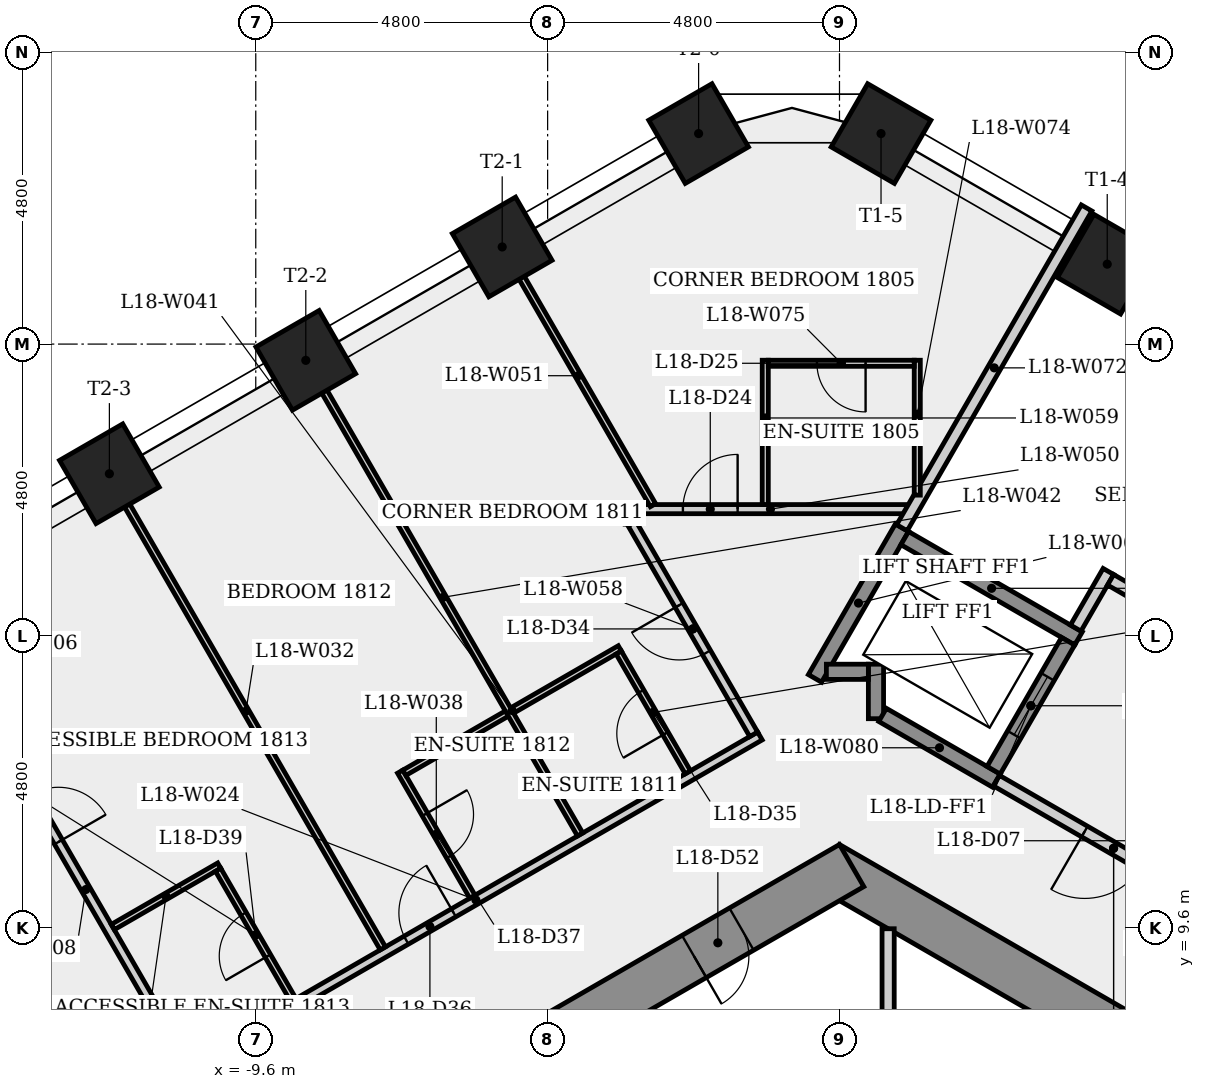
"""IFC4 building model, lengths in metres.
Left out: names, types, materials, properties, quantities, classifications, styles, units other than length and angle.
Written with IfcOpenShell. Run it as: python <this file> out.ifc"""

import sys

from ifc_helpers import new_model, si_unit, direction, frame, frame_2d, origin, origin_2d, place, context, subcontext, project, spatial, rectangle, extrude, element, fill, save


model = new_model("IFC4")
c1 = context("Model", 3, precision=1e-05, world=origin(), true_north=direction((0.0, 1.0)))
c2 = subcontext(c1, "Body", "Model", "MODEL_VIEW")
j1 = project(units=[si_unit("LENGTHUNIT", "METRE"), si_unit("PLANEANGLEUNIT", "RADIAN")], contexts=[c1])
p1 = place(None, origin())
s1 = spatial("IfcSite", under=j1, at=p1, CompositionType="ELEMENT")
p2 = place(p1, origin())
s2 = spatial("IfcBuilding", under=s1, at=p2, CompositionType="ELEMENT")
p3 = place(p2, frame((0.0, 0.0, 70.3)))
s3 = spatial("IfcBuildingStorey", under=s2, at=p3, CompositionType="ELEMENT", Elevation=70.3)
p4 = place(p3, frame((9.3, 5.138, 0.0), z_axis=(0.0, 0.0, 1.0), x_axis=(-0.866023993627, 0.500002442456, 0.0)))
e1 = element("IfcWall", 1, at=p4, inside=s3, PredefinedType="SHEAR", context=c2, shape_type="SweptSolid", body=[
    extrude(rectangle(XDim=10.97, YDim=0.8, at=frame_2d((5.485, 0.0))), origin(), (0.0, 0.0, 1.0), 4.0),
])
p5 = place(p4, frame((2.962, 0.0, 0.0)))
e2 = element("IfcOpeningElement", 2, at=p5, cuts=e1, PredefinedType="OPENING", context=c2, shape_type="SweptSolid", body=[
    extrude(rectangle(XDim=0.9, YDim=2.1, at=frame_2d((0.45, 1.05))), frame((0.0, 0.41, 0.0), z_axis=(0.0, -1.0, 0.0), x_axis=(1.0, 0.0, 0.0)), (0.0, 0.0, 1.0), 0.82),
])
p6 = place(p3, frame((0.2, 10.623, 0.0), z_axis=(0.0, 0.0, 1.0), x_axis=(-0.866023993627, -0.500002442456, 0.0)))
e3 = element("IfcWall", 3, at=p6, inside=s3, PredefinedType="SHEAR", context=c2, shape_type="SweptSolid", body=[
    extrude(rectangle(XDim=10.97, YDim=0.8, at=frame_2d((5.485, 0.0))), origin(), (0.0, 0.0, 1.0), 4.0),
])
p7 = place(p6, frame((9.325, 0.0, 0.0)))
e4 = element("IfcOpeningElement", 4, at=p7, cuts=e3, PredefinedType="OPENING", context=c2, shape_type="SweptSolid", body=[
    extrude(rectangle(XDim=0.9, YDim=2.1, at=frame_2d((0.45, 1.05))), frame((0.0, 0.41, 0.0), z_axis=(0.0, -1.0, 0.0), x_axis=(1.0, 0.0, 0.0)), (0.0, 0.0, 1.0), 0.82),
])
p8 = place(p6, frame((2.091, 0.0, 0.0)))
e5 = element("IfcOpeningElement", 5, at=p8, cuts=e3, PredefinedType="OPENING", context=c2, shape_type="SweptSolid", body=[
    extrude(rectangle(XDim=0.9, YDim=2.1, at=frame_2d((0.45, 1.05))), frame((0.0, 0.41, 0.0), z_axis=(0.0, -1.0, 0.0), x_axis=(1.0, 0.0, 0.0)), (0.0, 0.0, 1.0), 0.82),
])
for number, where, z_axis, x_axis in (
    (6, (4.403, 20.514, 0.0), (0.0, 0.0, 1.0), (0.5, 0.866, 0.0)),
    (7, (0.683, 22.662, 0.0), (0.0, 0.0, 1.0), (0.5, 0.866, 0.0)),
    (8, (-2.317, 22.662, 0.0), (0.0, 0.0, 1.0), (-0.5, 0.866, 0.0)),
    (9, (-5.547, 20.797, 0.0), (0.0, 0.0, 1.0), (-0.5, 0.866, 0.0)),
    (10, (-8.777, 18.932, 0.0), (0.0, 0.0, 1.0), (-0.5, 0.866, 0.0)),
    (11, (-12.007, 17.068, 0.0), (0.0, 0.0, 1.0), (-0.5, 0.866, 0.0)),
):
    element("IfcColumn", number, at=place(p3, frame(where, z_axis=z_axis, x_axis=x_axis)), inside=s3, PredefinedType="COLUMN", context=c2, shape_type="SweptSolid", body=[
        extrude(rectangle(XDim=1.2, YDim=1.2, at=origin_2d()), origin(), (0.0, 0.0, 1.0), 4.0),
    ])
p9 = place(p3, frame((-14.11, 13.2, 0.0), z_axis=(0.0, 0.0, 1.0), x_axis=(0.500007857356, -0.866020867291, 0.0)))
e12 = element("IfcWall", 12, at=p9, inside=s3, PredefinedType="PARTITIONING", context=c2, shape_type="SweptSolid", body=[
    extrude(rectangle(XDim=6.862, YDim=0.15, at=frame_2d((3.431, 0.0))), origin(), (0.0, 0.0, 1.0), 3.6),
])
p10 = place(p9, frame((1.628, 0.0, 0.0)))
e13 = element("IfcOpeningElement", 13, at=p10, cuts=e12, PredefinedType="OPENING", context=c2, shape_type="SweptSolid", body=[
    extrude(rectangle(XDim=0.9, YDim=2.1, at=frame_2d((0.45, 1.05))), frame((0.0, 0.085, 0.0), z_axis=(0.0, -1.0, 0.0), x_axis=(1.0, 0.0, 0.0)), (0.0, 0.0, 1.0), 0.17),
])
p11 = place(p3, frame((-10.651, 7.361, 0.0), z_axis=(0.0, 0.0, 1.0), x_axis=(0.866029938532, 0.499992145504, 0.0)))
e14 = element("IfcWall", 14, at=p11, inside=s3, PredefinedType="PARTITIONING", context=c2, shape_type="SweptSolid", body=[
    extrude(rectangle(XDim=10.788, YDim=0.15, at=frame_2d((5.394, 0.0))), origin(), (0.0, 0.0, 1.0), 3.6),
])
p12 = place(p11, frame((4.071, 0.0, 0.0)))
e15 = element("IfcOpeningElement", 15, at=p12, cuts=e14, PredefinedType="OPENING", context=c2, shape_type="SweptSolid", body=[
    extrude(rectangle(XDim=0.9, YDim=2.1, at=frame_2d((0.45, 1.05))), frame((0.0, 0.085, 0.0), z_axis=(0.0, -1.0, 0.0), x_axis=(1.0, 0.0, 0.0)), (0.0, 0.0, 1.0), 0.17),
])
p13 = place(p3, frame((-10.201, 10.623, 0.0), z_axis=(0.0, 0.0, 1.0), x_axis=(-0.866026663364, -0.499997818338, 0.0)))
e16 = element("IfcWall", 16, at=p13, inside=s3, PredefinedType="PARTITIONING", context=c2, shape_type="SweptSolid", body=[
    extrude(rectangle(XDim=2.021, YDim=0.1, at=frame_2d((1.01, 0.0))), origin(), (0.0, 0.0, 1.0), 3.6),
])
p14 = place(p3, frame((-8.982, 8.411, 0.0), z_axis=(0.0, 0.0, 1.0), x_axis=(-0.4999899861, 0.866031185235, 0.0)))
e17 = element("IfcWall", 17, at=p14, inside=s3, PredefinedType="PARTITIONING", context=c2, shape_type="SweptSolid", body=[
    extrude(rectangle(XDim=2.475, YDim=0.1, at=frame_2d((1.238, 0.0))), origin(), (0.0, 0.0, 1.0), 3.6),
])
p15 = place(p14, frame((0.837, 0.0, 0.0)))
e18 = element("IfcOpeningElement", 18, at=p15, cuts=e17, PredefinedType="OPENING", context=c2, shape_type="SweptSolid", body=[
    extrude(rectangle(XDim=0.8, YDim=2.1, at=frame_2d((0.4, 1.05))), frame((0.0, 0.06, 0.0), z_axis=(0.0, -1.0, 0.0), x_axis=(1.0, 0.0, 0.0)), (0.0, 0.0, 1.0), 0.12),
])
p16 = place(p3, frame((-7.51, 9.261, 0.0), z_axis=(0.0, 0.0, 1.0), x_axis=(-0.500009404554, 0.866019973994, 0.0)))
e19 = element("IfcWall", 19, at=p16, inside=s3, PredefinedType="PARTITIONING", context=c2, shape_type="SweptSolid", body=[
    extrude(rectangle(XDim=9.01, YDim=0.1, at=frame_2d((4.505, 0.0))), origin(), (0.0, 0.0, 1.0), 3.6),
])
p17 = place(p3, frame((-7.225, 12.168, 0.0), z_axis=(0.0, 0.0, 1.0), x_axis=(0.500030943131, -0.866007538022, 0.0)))
e20 = element("IfcWall", 20, at=p17, inside=s3, PredefinedType="PARTITIONING", context=c2, shape_type="SweptSolid", body=[
    extrude(rectangle(XDim=2.375, YDim=0.1, at=frame_2d((1.188, 0.0))), origin(), (0.0, 0.0, 1.0), 3.6),
])
p18 = place(p17, frame((0.812, 0.0, 0.0)))
e21 = element("IfcOpeningElement", 21, at=p18, cuts=e20, PredefinedType="OPENING", context=c2, shape_type="SweptSolid", body=[
    extrude(rectangle(XDim=0.8, YDim=2.1, at=frame_2d((0.4, 1.05))), frame((0.0, 0.06, 0.0), z_axis=(0.0, -1.0, 0.0), x_axis=(1.0, 0.0, 0.0)), (0.0, 0.0, 1.0), 0.12),
])
p19 = place(p3, frame((-7.156, 12.149, 0.0), z_axis=(0.0, 0.0, 1.0), x_axis=(0.866005746929, 0.500034045127, 0.0)))
e22 = element("IfcWall", 22, at=p19, inside=s3, PredefinedType="PARTITIONING", context=c2, shape_type="SweptSolid", body=[
    extrude(rectangle(XDim=4.092, YDim=0.1, at=frame_2d((2.046, 0.0))), origin(), (0.0, 0.0, 1.0), 3.6),
])
p20 = place(p3, frame((-8.77, 18.937, 0.0), z_axis=(0.0, 0.0, 1.0), x_axis=(0.499997670926, -0.866026748472, 0.0)))
e23 = element("IfcWall", 23, at=p20, inside=s3, PredefinedType="PARTITIONING", context=c2, shape_type="SweptSolid", body=[
    extrude(rectangle(XDim=9.01, YDim=0.1, at=frame_2d((4.505, 0.0))), origin(), (0.0, 0.0, 1.0), 3.6),
])
p21 = place(p3, frame((-3.45, 16.239, 0.0), z_axis=(0.0, 0.0, 1.0), x_axis=(0.0, 1.0, 0.0)))
e24 = element("IfcWall", 24, at=p21, inside=s3, PredefinedType="PARTITIONING", context=c2, shape_type="SweptSolid", body=[
    extrude(rectangle(XDim=0.322, YDim=0.15, at=frame_2d((0.161, 0.0))), origin(), (0.0, 0.0, 1.0), 3.6),
])
p22 = place(p3, frame((-3.375, 16.485, 0.0), z_axis=(0.0, 0.0, 1.0), x_axis=(1.0, 0.0, 0.0)))
e25 = element("IfcWall", 25, at=p22, inside=s3, PredefinedType="PARTITIONING", context=c2, shape_type="SweptSolid", body=[
    extrude(rectangle(XDim=4.479, YDim=0.15, at=frame_2d((2.24, 0.0))), origin(), (0.0, 0.0, 1.0), 3.6),
])
p23 = place(p22, frame((0.8, 0.0, 0.0)))
e26 = element("IfcOpeningElement", 26, at=p23, cuts=e25, PredefinedType="OPENING", context=c2, shape_type="SweptSolid", body=[
    extrude(rectangle(XDim=0.9, YDim=2.1, at=frame_2d((0.45, 1.05))), frame((0.0, 0.085, 0.0), z_axis=(0.0, -1.0, 0.0), x_axis=(1.0, 0.0, 0.0)), (0.0, 0.0, 1.0), 0.17),
])
p24 = place(p3, frame((-3.067, 16.55, 0.0), z_axis=(0.0, 0.0, 1.0), x_axis=(-0.499983141994, 0.86603513654, 0.0)))
e27 = element("IfcWall", 27, at=p24, inside=s3, PredefinedType="PARTITIONING", context=c2, shape_type="SweptSolid", body=[
    extrude(rectangle(XDim=4.918, YDim=0.1, at=frame_2d((2.459, 0.0))), origin(), (0.0, 0.0, 1.0), 3.6),
])
p25 = place(p3, frame((-2.494, 12.157, 0.0), z_axis=(0.0, 0.0, 1.0), x_axis=(-0.499982560684, 0.866035472144, 0.0)))
e28 = element("IfcWall", 28, at=p25, inside=s3, PredefinedType="PARTITIONING", context=c2, shape_type="SweptSolid", body=[
    extrude(rectangle(XDim=2.275, YDim=0.1, at=frame_2d((1.137, 0.0))), origin(), (0.0, 0.0, 1.0), 3.6),
])
p26 = place(p25, frame((0.738, 0.0, 0.0)))
e29 = element("IfcOpeningElement", 29, at=p26, cuts=e28, PredefinedType="OPENING", context=c2, shape_type="SweptSolid", body=[
    extrude(rectangle(XDim=0.8, YDim=2.1, at=frame_2d((0.4, 1.05))), frame((0.0, 0.06, 0.0), z_axis=(0.0, -1.0, 0.0), x_axis=(1.0, 0.0, 0.0)), (0.0, 0.0, 1.0), 0.12),
])
p27 = place(p3, frame((-1.411, 12.782, 0.0), z_axis=(0.0, 0.0, 1.0), x_axis=(-0.500055051143, 0.865993617659, 0.0)))
e30 = element("IfcWall", 30, at=p27, inside=s3, PredefinedType="PARTITIONING", context=c2, shape_type="SweptSolid", body=[
    extrude(rectangle(XDim=4.003, YDim=0.15, at=frame_2d((2.001, 0.0))), origin(), (0.0, 0.0, 1.0), 3.6),
])
p28 = place(p27, frame((1.552, 0.0, 0.0)))
e31 = element("IfcOpeningElement", 31, at=p28, cuts=e30, PredefinedType="OPENING", context=c2, shape_type="SweptSolid", body=[
    extrude(rectangle(XDim=0.9, YDim=2.1, at=frame_2d((0.45, 1.05))), frame((0.0, 0.085, 0.0), z_axis=(0.0, -1.0, 0.0), x_axis=(1.0, 0.0, 0.0)), (0.0, 0.0, 1.0), 0.17),
])
p29 = place(p3, frame((-1.221, 18.934, 0.0), z_axis=(0.0, 0.0, 1.0), x_axis=(0.0, -1.0, 0.0)))
e32 = element("IfcWall", 32, at=p29, inside=s3, PredefinedType="PARTITIONING", context=c2, shape_type="SweptSolid", body=[
    extrude(rectangle(XDim=2.374, YDim=0.1, at=frame_2d((1.187, 0.0))), origin(), (0.0, 0.0, 1.0), 3.6),
])
p30 = place(p3, frame((-0.403, 13.702, 0.0), z_axis=(0.0, 0.0, 1.0), x_axis=(0.499976111731, 0.866039195244, 0.0)))
e33 = element("IfcWall", 33, at=p30, inside=s3, PredefinedType="SHEAR", context=c2, shape_type="SweptSolid", body=[
    extrude(rectangle(XDim=2.861, YDim=0.25, at=frame_2d((1.43, 0.0))), origin(), (0.0, 0.0, 1.0), 3.6),
])
p31 = place(p3, frame((0.6, 13.039, 0.0), z_axis=(0.0, 0.0, 1.0), x_axis=(0.0, 1.0, 0.0)))
e34 = element("IfcWall", 34, at=p31, inside=s3, PredefinedType="SHEAR", context=c2, shape_type="SweptSolid", body=[
    extrude(rectangle(XDim=0.896, YDim=0.25, at=frame_2d((0.448, 0.0))), origin(), (0.0, 0.0, 1.0), 3.6),
])
p32 = place(p3, frame((0.475, 13.81, 0.0), z_axis=(0.0, 0.0, 1.0), x_axis=(-1.0, 0.0, 0.0)))
e35 = element("IfcWall", 35, at=p32, inside=s3, PredefinedType="SHEAR", context=c2, shape_type="SweptSolid", body=[
    extrude(rectangle(XDim=0.691, YDim=0.25, at=frame_2d((0.345, 0.0))), origin(), (0.0, 0.0, 1.0), 4.0),
])
p33 = place(p3, frame((0.8, 9.584, 0.0), z_axis=(0.0, 0.0, 1.0), x_axis=(0.0, -1.0, 0.0)))
e36 = element("IfcWall", 36, at=p33, inside=s3, PredefinedType="PARTITIONING", context=c2, shape_type="SweptSolid", body=[
    extrude(rectangle(XDim=4.309, YDim=0.2, at=frame_2d((2.155, 0.0))), origin(), (0.0, 0.0, 1.0), 3.6),
])
p34 = place(p3, frame((1.027, 16.179, 0.0), z_axis=(0.0, 0.0, 1.0), x_axis=(0.49999965181, 0.866025604812, 0.0)))
e37 = element("IfcWall", 37, at=p34, inside=s3, PredefinedType="PLUMBINGWALL", context=c2, shape_type="SweptSolid", body=[
    extrude(rectangle(XDim=6.074, YDim=0.2, at=frame_2d((3.037, 0.0))), origin(), (0.0, 0.0, 1.0), 3.6),
])
p35 = place(p3, frame((1.073, 16.008, 0.0), z_axis=(0.0, 0.0, 1.0), x_axis=(0.866040211805, -0.499974350878, 0.0)))
e38 = element("IfcWall", 38, at=p35, inside=s3, PredefinedType="SHEAR", context=c2, shape_type="SweptSolid", body=[
    extrude(rectangle(XDim=3.3, YDim=0.25, at=frame_2d((1.65, 0.0))), origin(), (0.0, 0.0, 1.0), 3.6),
])
p36 = place(p3, frame((1.279, 16.716, 0.0), z_axis=(0.0, 0.0, 1.0), x_axis=(0.0, 1.0, 0.0)))
e39 = element("IfcWall", 39, at=p36, inside=s3, PredefinedType="PARTITIONING", context=c2, shape_type="SweptSolid", body=[
    extrude(rectangle(XDim=2.219, YDim=0.1, at=frame_2d((1.109, 0.0))), origin(), (0.0, 0.0, 1.0), 3.6),
])
p37 = place(p3, frame((1.229, 18.885, 0.0), z_axis=(0.0, 0.0, 1.0), x_axis=(-1.0, 0.0, 0.0)))
e40 = element("IfcWall", 40, at=p37, inside=s3, PredefinedType="PARTITIONING", context=c2, shape_type="SweptSolid", body=[
    extrude(rectangle(XDim=2.4, YDim=0.1, at=frame_2d((1.2, 0.0))), origin(), (0.0, 0.0, 1.0), 3.6),
])
p38 = place(p37, frame((0.8, 0.0, 0.0)))
e41 = element("IfcOpeningElement", 41, at=p38, cuts=e40, PredefinedType="OPENING", context=c2, shape_type="SweptSolid", body=[
    extrude(rectangle(XDim=0.8, YDim=2.1, at=frame_2d((0.4, 1.05))), frame((0.0, 0.06, 0.0), z_axis=(0.0, -1.0, 0.0), x_axis=(1.0, 0.0, 0.0)), (0.0, 0.0, 1.0), 0.12),
])
p39 = place(p3, frame((2.581, 12.02, 0.0), z_axis=(0.0, 0.0, 1.0), x_axis=(-0.86603892542, 0.499976579108, 0.0)))
e42 = element("IfcWall", 42, at=p39, inside=s3, PredefinedType="SHEAR", context=c2, shape_type="SweptSolid", body=[
    extrude(rectangle(XDim=2.162, YDim=0.25, at=frame_2d((1.081, 0.0))), origin(), (0.0, 0.0, 1.0), 3.6),
])
p40 = place(p3, frame((2.535, 12.191, 0.0), z_axis=(0.0, 0.0, 1.0), x_axis=(0.500061746146, 0.865989751695, 0.0)))
e43 = element("IfcWall", 43, at=p40, inside=s3, PredefinedType="SHEAR", context=c2, shape_type="SweptSolid", body=[
    extrude(rectangle(XDim=2.45, YDim=0.25, at=frame_2d((1.225, 0.0))), origin(), (0.0, 0.0, 1.0), 4.0),
])
p41 = place(p40, frame((0.675, 0.0, 0.0)))
e44 = element("IfcOpeningElement", 44, at=p41, cuts=e43, PredefinedType="OPENING", context=c2, shape_type="SweptSolid", body=[
    extrude(rectangle(XDim=1.1, YDim=2.1, at=frame_2d((0.55, 1.05))), frame((0.0, 0.135, 0.0), z_axis=(0.0, -1.0, 0.0), x_axis=(1.0, 0.0, 0.0)), (0.0, 0.0, 1.0), 0.27),
])
p42 = place(p3, frame((3.885, 14.529, 0.0), z_axis=(0.0, 0.0, 1.0), x_axis=(0.499997628298, 0.866026773083, 0.0)))
e45 = element("IfcWall", 45, at=p42, inside=s3, PredefinedType="PLUMBINGWALL", context=c2, shape_type="SweptSolid", body=[
    extrude(rectangle(XDim=1.075, YDim=0.2, at=frame_2d((0.538, 0.0))), origin(), (0.0, 0.0, 1.0), 3.6),
])
p43 = place(p3, frame((4.459, 15.323, 0.0), z_axis=(0.0, 0.0, 1.0), x_axis=(0.866016039709, -0.500016218704, 0.0)))
e46 = element("IfcWall", 46, at=p43, inside=s3, PredefinedType="PLUMBINGWALL", context=c2, shape_type="SweptSolid", body=[
    extrude(rectangle(XDim=4.7, YDim=0.2, at=frame_2d((2.35, 0.0))), origin(), (0.0, 0.0, 1.0), 3.6),
])
p44 = place(p3, frame((6.435, 9.795, 0.0), z_axis=(0.0, 0.0, 1.0), x_axis=(-0.866012907634, 0.500021643343, 0.0)))
e47 = element("IfcWall", 47, at=p44, inside=s3, PredefinedType="PARTITIONING", context=c2, shape_type="SweptSolid", body=[
    extrude(rectangle(XDim=4.45, YDim=0.2, at=frame_2d((2.225, 0.0))), origin(), (0.0, 0.0, 1.0), 3.6),
])
p45 = place(p44, frame((1.675, 0.0, 0.0)))
e48 = element("IfcOpeningElement", 48, at=p45, cuts=e47, PredefinedType="OPENING", context=c2, shape_type="SweptSolid", body=[
    extrude(rectangle(XDim=1.1, YDim=2.1, at=frame_2d((0.55, 1.05))), frame((0.0, 0.11, 0.0), z_axis=(0.0, -1.0, 0.0), x_axis=(1.0, 0.0, 0.0)), (0.0, 0.0, 1.0), 0.22),
])
p46 = place(p45, origin())
e49 = element("IfcDoor", 49, at=p46, inside=s3, OperationType="SINGLE_SWING_RIGHT", PredefinedType="DOOR", context=c2, shape_type="SweptSolid", body=[
    extrude(rectangle(XDim=1.1, YDim=2.1, at=frame_2d((0.55, 1.05))), frame((0.0, 0.025, 0.0), z_axis=(0.0, -1.0, 0.0), x_axis=(1.0, 0.0, 0.0)), (0.0, 0.0, 1.0), 0.05),
])
fill(e48, e49)
p47 = place(p41, origin())
e50 = element("IfcDoor", 50, at=p47, inside=s3, OperationType="SLIDING_TO_LEFT", PredefinedType="DOOR", context=c2, shape_type="SweptSolid", body=[
    extrude(rectangle(XDim=1.1, YDim=2.1, at=frame_2d((0.55, 1.05))), frame((0.0, 0.025, 0.0), z_axis=(0.0, -1.0, 0.0), x_axis=(1.0, 0.0, 0.0)), (0.0, 0.0, 1.0), 0.05),
])
fill(e44, e50)
p48 = place(p23, origin())
e51 = element("IfcDoor", 51, at=p48, inside=s3, OperationType="SINGLE_SWING_RIGHT", PredefinedType="DOOR", context=c2, shape_type="SweptSolid", body=[
    extrude(rectangle(XDim=0.9, YDim=2.1, at=frame_2d((0.45, 1.05))), frame((0.0, 0.025, 0.0), z_axis=(0.0, -1.0, 0.0), x_axis=(1.0, 0.0, 0.0)), (0.0, 0.0, 1.0), 0.05),
])
fill(e26, e51)
p49 = place(p38, origin())
e52 = element("IfcDoor", 52, at=p49, inside=s3, OperationType="SINGLE_SWING_LEFT", PredefinedType="DOOR", context=c2, shape_type="SweptSolid", body=[
    extrude(rectangle(XDim=0.8, YDim=2.1, at=frame_2d((0.4, 1.05))), frame((0.0, 0.025, 0.0), z_axis=(0.0, -1.0, 0.0), x_axis=(1.0, 0.0, 0.0)), (0.0, 0.0, 1.0), 0.05),
])
fill(e41, e52)
p50 = place(p28, origin())
e53 = element("IfcDoor", 53, at=p50, inside=s3, OperationType="SINGLE_SWING_RIGHT", PredefinedType="DOOR", context=c2, shape_type="SweptSolid", body=[
    extrude(rectangle(XDim=0.9, YDim=2.1, at=frame_2d((0.45, 1.05))), frame((0.0, 0.025, 0.0), z_axis=(0.0, -1.0, 0.0), x_axis=(1.0, 0.0, 0.0)), (0.0, 0.0, 1.0), 0.05),
])
fill(e31, e53)
p51 = place(p26, origin())
e54 = element("IfcDoor", 54, at=p51, inside=s3, OperationType="SINGLE_SWING_LEFT", PredefinedType="DOOR", context=c2, shape_type="SweptSolid", body=[
    extrude(rectangle(XDim=0.8, YDim=2.1, at=frame_2d((0.4, 1.05))), frame((0.0, 0.025, 0.0), z_axis=(0.0, -1.0, 0.0), x_axis=(1.0, 0.0, 0.0)), (0.0, 0.0, 1.0), 0.05),
])
fill(e29, e54)
p52 = place(p12, origin())
e55 = element("IfcDoor", 55, at=p52, inside=s3, OperationType="SINGLE_SWING_RIGHT", PredefinedType="DOOR", context=c2, shape_type="SweptSolid", body=[
    extrude(rectangle(XDim=0.9, YDim=2.1, at=frame_2d((0.45, 1.05))), frame((0.0, 0.025, 0.0), z_axis=(0.0, -1.0, 0.0), x_axis=(1.0, 0.0, 0.0)), (0.0, 0.0, 1.0), 0.05),
])
fill(e15, e55)
p53 = place(p18, origin())
e56 = element("IfcDoor", 56, at=p53, inside=s3, OperationType="SINGLE_SWING_LEFT", PredefinedType="DOOR", context=c2, shape_type="SweptSolid", body=[
    extrude(rectangle(XDim=0.8, YDim=2.1, at=frame_2d((0.4, 1.05))), frame((0.0, 0.025, 0.0), z_axis=(0.0, -1.0, 0.0), x_axis=(1.0, 0.0, 0.0)), (0.0, 0.0, 1.0), 0.05),
])
fill(e21, e56)
p54 = place(p10, origin())
e57 = element("IfcDoor", 57, at=p54, inside=s3, OperationType="SINGLE_SWING_RIGHT", PredefinedType="DOOR", context=c2, shape_type="SweptSolid", body=[
    extrude(rectangle(XDim=0.9, YDim=2.1, at=frame_2d((0.45, 1.05))), frame((0.0, 0.025, 0.0), z_axis=(0.0, -1.0, 0.0), x_axis=(1.0, 0.0, 0.0)), (0.0, 0.0, 1.0), 0.05),
])
fill(e13, e57)
p55 = place(p15, origin())
e58 = element("IfcDoor", 58, at=p55, inside=s3, OperationType="SINGLE_SWING_LEFT", PredefinedType="DOOR", context=c2, shape_type="SweptSolid", body=[
    extrude(rectangle(XDim=0.8, YDim=2.1, at=frame_2d((0.4, 1.05))), frame((0.0, 0.025, 0.0), z_axis=(0.0, -1.0, 0.0), x_axis=(1.0, 0.0, 0.0)), (0.0, 0.0, 1.0), 0.05),
])
fill(e18, e58)
p56 = place(p8, origin())
e59 = element("IfcDoor", 59, at=p56, inside=s3, OperationType="SINGLE_SWING_RIGHT", PredefinedType="DOOR", context=c2, shape_type="SweptSolid", body=[
    extrude(rectangle(XDim=0.9, YDim=2.1, at=frame_2d((0.45, 1.05))), frame((0.0, 0.025, 0.0), z_axis=(0.0, -1.0, 0.0), x_axis=(1.0, 0.0, 0.0)), (0.0, 0.0, 1.0), 0.05),
])
fill(e5, e59)
save(model, sys.argv[1])
